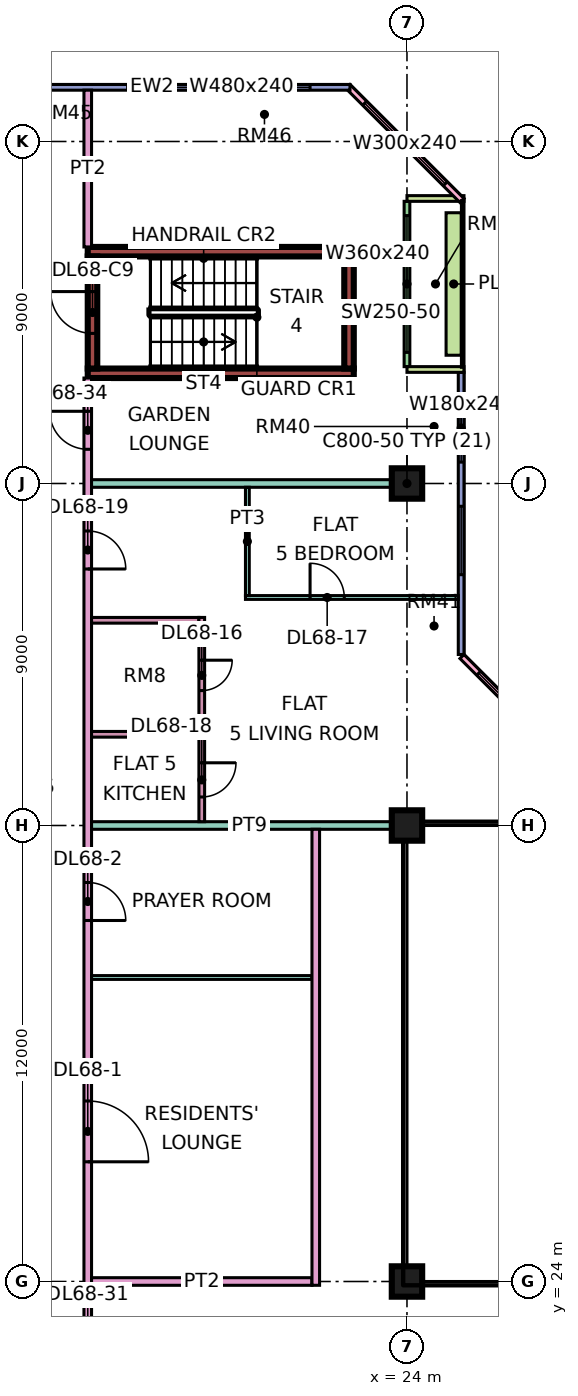
"""IFC4 building model, lengths in metres.
Left out: names, types, materials, properties, quantities, classifications, styles, units other than length and angle.
Written with IfcOpenShell. Run it as: python <this file> out.ifc"""

import sys

from ifc_helpers import new_model, si_unit, direction, frame, frame_2d, origin, origin_2d, place, context, subcontext, project, spatial, rectangle, extrude, element, fill, save


model = new_model("IFC4")
c1 = context("Model", 3, precision=1e-05, world=origin(), true_north=direction((0.0, 1.0)))
c2 = subcontext(c1, "Body", "Model", "MODEL_VIEW")
j1 = project(units=[si_unit("LENGTHUNIT", "METRE"), si_unit("PLANEANGLEUNIT", "RADIAN")], contexts=[c1])
p1 = place(None, origin())
s1 = spatial("IfcSite", under=j1, at=p1, CompositionType="ELEMENT")
p2 = place(p1, origin())
s2 = spatial("IfcBuilding", under=s1, at=p2, CompositionType="ELEMENT")
p3 = place(p2, frame((0.0, 0.0, 292.15)))
s3 = spatial("IfcBuildingStorey", under=s2, at=p3, CompositionType="ELEMENT", Elevation=292.15)
for number, where, z_axis, x_axis in (
    (1, (24.0, 24.0, 0.0), (0.0, 0.0, 1.0), (1.0, 0.0, 0.0)),
    (2, (24.0, 36.0, 0.0), (0.0, 0.0, 1.0), (1.0, 0.0, 0.0)),
    (3, (24.0, 45.0, 0.0), (0.0, 0.0, 1.0), (1.0, 0.0, 0.0)),
):
    element("IfcColumn", number, at=place(p3, frame(where, z_axis=z_axis, x_axis=x_axis)), inside=s3, PredefinedType="COLUMN", context=c2, shape_type="SweptSolid", body=[
        extrude(rectangle(XDim=0.8, YDim=0.8, at=origin_2d()), origin(), (0.0, 0.0, 1.0), 3.75),
    ])
for number, where, z_axis, x_axis in (
    (4, (15.6, 47.9, 0.0), (0.0, 0.0, 1.0), (1.0, 0.0, 0.0)),
    (5, (15.6, 51.1, 0.0), (0.0, 0.0, 1.0), (1.0, 0.0, 0.0)),
):
    element("IfcWall", number, at=place(p3, frame(where, z_axis=z_axis, x_axis=x_axis)), inside=s3, PredefinedType="SHEAR", context=c2, shape_type="SweptSolid", body=[
        extrude(rectangle(XDim=7.0, YDim=0.25, at=frame_2d((3.5, 0.0))), origin(), (0.0, 0.0, 1.0), 3.75),
    ])
p4 = place(p3, frame((15.725, 48.025, 0.0), z_axis=(0.0, 0.0, 1.0), x_axis=(0.0, 1.0, 0.0)))
e6 = element("IfcWall", 6, at=p4, inside=s3, PredefinedType="SHEAR", context=c2, shape_type="SweptSolid", body=[
    extrude(rectangle(XDim=2.95, YDim=0.25, at=frame_2d((1.475, 0.0))), origin(), (0.0, 0.0, 1.0), 3.75),
])
p5 = place(p4, frame((0.925, 0.0, 0.0)))
e7 = element("IfcOpeningElement", 7, at=p5, cuts=e6, PredefinedType="OPENING", context=c2, shape_type="SweptSolid", body=[
    extrude(rectangle(XDim=1.1, YDim=2.2, at=frame_2d((0.55, 1.1))), frame((0.0, 0.135, 0.0), z_axis=(0.0, -1.0, 0.0), x_axis=(1.0, 0.0, 0.0)), (0.0, 0.0, 1.0), 0.27),
])
p6 = place(p3, frame((22.475, 48.025, 0.0), z_axis=(0.0, 0.0, 1.0), x_axis=(0.0, 1.0, 0.0)))
e8 = element("IfcWall", 8, at=p6, inside=s3, PredefinedType="SHEAR", context=c2, shape_type="SweptSolid", body=[
    extrude(rectangle(XDim=2.95, YDim=0.25, at=frame_2d((1.475, 0.0))), origin(), (0.0, 0.0, 1.0), 3.75),
])
p7 = place(p3, frame((28.447, 37.447, 0.0), z_axis=(0.0, 0.0, 1.0), x_axis=(-0.707106781187, 0.707106781187, 0.0)))
e9 = element("IfcWall", 9, at=p7, inside=s3, PredefinedType="SOLIDWALL", context=c2, shape_type="SweptSolid", body=[
    extrude(rectangle(XDim=4.243, YDim=0.15, at=frame_2d((2.121, 0.0))), origin(), (0.0, 0.0, 1.0), 3.35),
])
p8 = place(p7, frame((0.621, 0.0, 0.45)))
e10 = element("IfcOpeningElement", 10, at=p8, cuts=e9, PredefinedType="OPENING", context=c2, shape_type="SweptSolid", body=[
    extrude(rectangle(XDim=3.0, YDim=2.4, at=frame_2d((1.5, 1.2))), frame((0.0, 0.085, 0.0), z_axis=(0.0, -1.0, 0.0), x_axis=(1.0, 0.0, 0.0)), (0.0, 0.0, 1.0), 0.17),
])
p9 = place(p3, frame((25.425, 40.5, 0.0), z_axis=(0.0, 0.0, 1.0), x_axis=(0.0, 1.0, 0.0)))
e11 = element("IfcWall", 11, at=p9, inside=s3, PredefinedType="SOLIDWALL", context=c2, shape_type="SweptSolid", body=[
    extrude(rectangle(XDim=7.425, YDim=0.15, at=frame_2d((3.712, 0.0))), origin(), (0.0, 0.0, 1.0), 3.35),
])
p10 = place(p9, frame((2.1, 0.0, 0.45)))
e12 = element("IfcOpeningElement", 12, at=p10, cuts=e11, PredefinedType="OPENING", context=c2, shape_type="SweptSolid", body=[
    extrude(rectangle(XDim=1.8, YDim=2.4, at=frame_2d((0.9, 1.2))), frame((0.0, 0.085, 0.0), z_axis=(0.0, -1.0, 0.0), x_axis=(1.0, 0.0, 0.0)), (0.0, 0.0, 1.0), 0.17),
])
p11 = place(p9, frame((5.062, 0.0, 0.45)))
e13 = element("IfcOpeningElement", 13, at=p11, cuts=e11, PredefinedType="OPENING", context=c2, shape_type="SweptSolid", body=[
    extrude(rectangle(XDim=1.8, YDim=2.4, at=frame_2d((0.9, 1.2))), frame((0.0, 0.085, 0.0), z_axis=(0.0, -1.0, 0.0), x_axis=(1.0, 0.0, 0.0)), (0.0, 0.0, 1.0), 0.17),
])
p12 = place(p3, frame((24.0, 48.075, 0.0), z_axis=(0.0, 0.0, 1.0), x_axis=(0.0, 1.0, 0.0)))
e14 = element("IfcWall", 14, at=p12, inside=s3, PredefinedType="SOLIDWALL", context=c2, shape_type="SweptSolid", body=[
    extrude(rectangle(XDim=4.35, YDim=0.15, at=frame_2d((2.175, 0.0))), origin(), (0.0, 0.0, 1.0), 3.35),
])
p13 = place(p12, frame((0.375, 0.0, 0.45)))
e15 = element("IfcOpeningElement", 15, at=p13, cuts=e14, PredefinedType="OPENING", context=c2, shape_type="SweptSolid", body=[
    extrude(rectangle(XDim=3.6, YDim=2.4, at=frame_2d((1.8, 1.2))), frame((0.0, 0.085, 0.0), z_axis=(0.0, -1.0, 0.0), x_axis=(1.0, 0.0, 0.0)), (0.0, 0.0, 1.0), 0.17),
])
for number, where, z_axis, x_axis in (
    (16, (25.5, 48.0, 0.0), (0.0, 0.0, 1.0), (-1.0, 0.0, 0.0)),
    (17, (25.5, 52.5, 0.0), (0.0, 0.0, 1.0), (-1.0, 0.0, 0.0)),
):
    element("IfcWall", number, at=place(p3, frame(where, z_axis=z_axis, x_axis=x_axis)), inside=s3, PredefinedType="SOLIDWALL", context=c2, shape_type="SweptSolid", body=[
        extrude(rectangle(XDim=1.5, YDim=0.15, at=frame_2d((0.75, 0.0))), origin(), (0.0, 0.0, 1.0), 3.35),
    ])
p14 = place(p3, frame((25.447, 52.447, 0.0), z_axis=(0.0, 0.0, 1.0), x_axis=(-0.707106781187, 0.707106781187, 0.0)))
e18 = element("IfcWall", 18, at=p14, inside=s3, PredefinedType="SOLIDWALL", context=c2, shape_type="SweptSolid", body=[
    extrude(rectangle(XDim=4.243, YDim=0.15, at=frame_2d((2.121, 0.0))), origin(), (0.0, 0.0, 1.0), 3.35),
])
p15 = place(p14, frame((0.621, 0.0, 0.45)))
e19 = element("IfcOpeningElement", 19, at=p15, cuts=e18, PredefinedType="OPENING", context=c2, shape_type="SweptSolid", body=[
    extrude(rectangle(XDim=3.0, YDim=2.4, at=frame_2d((1.5, 1.2))), frame((0.0, 0.085, 0.0), z_axis=(0.0, -1.0, 0.0), x_axis=(1.0, 0.0, 0.0)), (0.0, 0.0, 1.0), 0.17),
])
p16 = place(p3, frame((22.5, 55.425, 0.0), z_axis=(0.0, 0.0, 1.0), x_axis=(-1.0, 0.0, 0.0)))
e20 = element("IfcWall", 20, at=p16, inside=s3, PredefinedType="SOLIDWALL", context=c2, shape_type="SweptSolid", body=[
    extrude(rectangle(XDim=10.425, YDim=0.15, at=frame_2d((5.212, 0.0))), origin(), (0.0, 0.0, 1.0), 3.35),
])
p17 = place(p16, frame((1.05, 0.0, 0.45)))
e21 = element("IfcOpeningElement", 21, at=p17, cuts=e20, PredefinedType="OPENING", context=c2, shape_type="SweptSolid", body=[
    extrude(rectangle(XDim=4.8, YDim=2.4, at=frame_2d((2.4, 1.2))), frame((0.0, 0.085, 0.0), z_axis=(0.0, -1.0, 0.0), x_axis=(1.0, 0.0, 0.0)), (0.0, 0.0, 1.0), 0.17),
])
p18 = place(p3, frame((25.229, 48.375, 0.0), z_axis=(0.0, 0.0, 1.0), x_axis=(0.0, 1.0, 0.0)))
e22 = element("IfcWall", 22, at=p18, inside=s3, PredefinedType="SOLIDWALL", context=c2, shape_type="SweptSolid", body=[
    extrude(rectangle(XDim=3.75, YDim=0.4, at=frame_2d((1.875, 0.0))), origin(), (0.0, 0.0, 1.0), 0.7),
])
p19 = place(p3, frame((15.6, 20.0, 0.0), z_axis=(0.0, 0.0, 1.0), x_axis=(0.0, 1.0, 0.0)))
e23 = element("IfcWall", 23, at=p19, inside=s3, PredefinedType="PARTITIONING", context=c2, shape_type="SweptSolid", body=[
    extrude(rectangle(XDim=27.775, YDim=0.2, at=frame_2d((13.887, 0.0))), origin(), (0.0, 0.0, 1.0), 3.35),
])
p20 = place(p19, frame((7.15, 0.0, 0.0)))
e24 = element("IfcOpeningElement", 24, at=p20, cuts=e23, PredefinedType="OPENING", context=c2, shape_type="SweptSolid", body=[
    extrude(rectangle(XDim=1.6, YDim=2.1, at=frame_2d((0.8, 1.05))), frame((0.0, 0.11, 0.0), z_axis=(0.0, -1.0, 0.0), x_axis=(1.0, 0.0, 0.0)), (0.0, 0.0, 1.0), 0.22),
])
p21 = place(p19, frame((13.5, 0.0, 0.0)))
e25 = element("IfcOpeningElement", 25, at=p21, cuts=e23, PredefinedType="OPENING", context=c2, shape_type="SweptSolid", body=[
    extrude(rectangle(XDim=1.0, YDim=2.1, at=frame_2d((0.5, 1.05))), frame((0.0, 0.11, 0.0), z_axis=(0.0, -1.0, 0.0), x_axis=(1.0, 0.0, 0.0)), (0.0, 0.0, 1.0), 0.22),
])
p22 = place(p19, frame((22.75, 0.0, 0.0)))
e26 = element("IfcOpeningElement", 26, at=p22, cuts=e23, PredefinedType="OPENING", context=c2, shape_type="SweptSolid", body=[
    extrude(rectangle(XDim=1.0, YDim=2.1, at=frame_2d((0.5, 1.05))), frame((0.0, 0.11, 0.0), z_axis=(0.0, -1.0, 0.0), x_axis=(1.0, 0.0, 0.0)), (0.0, 0.0, 1.0), 0.22),
])
p23 = place(p19, frame((1.15, 0.0, 0.0)))
e27 = element("IfcOpeningElement", 27, at=p23, cuts=e23, PredefinedType="OPENING", context=c2, shape_type="SweptSolid", body=[
    extrude(rectangle(XDim=1.8, YDim=2.1, at=frame_2d((0.9, 1.05))), frame((0.0, 0.11, 0.0), z_axis=(0.0, -1.0, 0.0), x_axis=(1.0, 0.0, 0.0)), (0.0, 0.0, 1.0), 0.22),
])
p24 = place(p19, frame((25.9, 0.0, 0.0)))
e28 = element("IfcOpeningElement", 28, at=p24, cuts=e23, PredefinedType="OPENING", context=c2, shape_type="SweptSolid", body=[
    extrude(rectangle(XDim=1.0, YDim=2.1, at=frame_2d((0.5, 1.05))), frame((0.0, 0.11, 0.0), z_axis=(0.0, -1.0, 0.0), x_axis=(1.0, 0.0, 0.0)), (0.0, 0.0, 1.0), 0.22),
])
p25 = place(p3, frame((15.6, 51.225, 0.0), z_axis=(0.0, 0.0, 1.0), x_axis=(0.0, 1.0, 0.0)))
e29 = element("IfcWall", 29, at=p25, inside=s3, PredefinedType="PARTITIONING", context=c2, shape_type="SweptSolid", body=[
    extrude(rectangle(XDim=4.125, YDim=0.2, at=frame_2d((2.062, 0.0))), origin(), (0.0, 0.0, 1.0), 3.35),
])
p26 = place(p3, frame((15.7, 24.0, 0.0), z_axis=(0.0, 0.0, 1.0), x_axis=(1.0, 0.0, 0.0)))
e30 = element("IfcWall", 30, at=p26, inside=s3, PredefinedType="PARTITIONING", context=c2, shape_type="SweptSolid", body=[
    extrude(rectangle(XDim=5.8, YDim=0.2, at=frame_2d((2.9, 0.0))), origin(), (0.0, 0.0, 1.0), 3.35),
])
p27 = place(p3, frame((15.7, 32.0, 0.0), z_axis=(0.0, 0.0, 1.0), x_axis=(1.0, 0.0, 0.0)))
e31 = element("IfcWall", 31, at=p27, inside=s3, PredefinedType="PARTITIONING", context=c2, shape_type="SweptSolid", body=[
    extrude(rectangle(XDim=5.8, YDim=0.1, at=frame_2d((2.9, 0.0))), origin(), (0.0, 0.0, 1.0), 3.35),
])
p28 = place(p3, frame((15.7, 36.0, 0.0), z_axis=(0.0, 0.0, 1.0), x_axis=(1.0, 0.0, 0.0)))
e32 = element("IfcWall", 32, at=p28, inside=s3, PredefinedType="PARTITIONING", context=c2, shape_type="SweptSolid", body=[
    extrude(rectangle(XDim=8.3, YDim=0.2, at=frame_2d((4.15, 0.0))), origin(), (0.0, 0.0, 1.0), 3.35),
])
for number, where, z_axis, x_axis in (
    (33, (15.7, 38.4, 0.0), (0.0, 0.0, 1.0), (1.0, 0.0, 0.0)),
    (34, (15.7, 41.4, 0.0), (0.0, 0.0, 1.0), (1.0, 0.0, 0.0)),
):
    element("IfcWall", number, at=place(p3, frame(where, z_axis=z_axis, x_axis=x_axis)), inside=s3, PredefinedType="PARTITIONING", context=c2, shape_type="SweptSolid", body=[
        extrude(rectangle(XDim=2.825, YDim=0.15, at=frame_2d((1.413, 0.0))), origin(), (0.0, 0.0, 1.0), 3.35),
    ])
p29 = place(p3, frame((15.7, 45.0, 0.0), z_axis=(0.0, 0.0, 1.0), x_axis=(1.0, 0.0, 0.0)))
e35 = element("IfcWall", 35, at=p29, inside=s3, PredefinedType="PARTITIONING", context=c2, shape_type="SweptSolid", body=[
    extrude(rectangle(XDim=8.3, YDim=0.2, at=frame_2d((4.15, 0.0))), origin(), (0.0, 0.0, 1.0), 3.35),
])
p30 = place(p3, frame((18.6, 36.1, 0.0), z_axis=(0.0, 0.0, 1.0), x_axis=(0.0, 1.0, 0.0)))
e36 = element("IfcWall", 36, at=p30, inside=s3, PredefinedType="PARTITIONING", context=c2, shape_type="SweptSolid", body=[
    extrude(rectangle(XDim=5.375, YDim=0.15, at=frame_2d((2.688, 0.0))), origin(), (0.0, 0.0, 1.0), 3.35),
])
p31 = place(p30, frame((3.45, 0.0, 0.0)))
e37 = element("IfcOpeningElement", 37, at=p31, cuts=e36, PredefinedType="OPENING", context=c2, shape_type="SweptSolid", body=[
    extrude(rectangle(XDim=0.8, YDim=2.1, at=frame_2d((0.4, 1.05))), frame((0.0, 0.085, 0.0), z_axis=(0.0, -1.0, 0.0), x_axis=(1.0, 0.0, 0.0)), (0.0, 0.0, 1.0), 0.17),
])
p32 = place(p30, frame((0.65, 0.0, 0.0)))
e38 = element("IfcOpeningElement", 38, at=p32, cuts=e36, PredefinedType="OPENING", context=c2, shape_type="SweptSolid", body=[
    extrude(rectangle(XDim=0.9, YDim=2.1, at=frame_2d((0.45, 1.05))), frame((0.0, 0.085, 0.0), z_axis=(0.0, -1.0, 0.0), x_axis=(1.0, 0.0, 0.0)), (0.0, 0.0, 1.0), 0.17),
])
p33 = place(p3, frame((19.75, 42.0, 0.0), z_axis=(0.0, 0.0, 1.0), x_axis=(1.0, 0.0, 0.0)))
e39 = element("IfcWall", 39, at=p33, inside=s3, PredefinedType="PARTITIONING", context=c2, shape_type="SweptSolid", body=[
    extrude(rectangle(XDim=5.6, YDim=0.1, at=frame_2d((2.8, 0.0))), origin(), (0.0, 0.0, 1.0), 3.35),
])
p34 = place(p33, frame((1.7, 0.0, 0.0)))
e40 = element("IfcOpeningElement", 40, at=p34, cuts=e39, PredefinedType="OPENING", context=c2, shape_type="SweptSolid", body=[
    extrude(rectangle(XDim=0.9, YDim=2.1, at=frame_2d((0.45, 1.05))), frame((0.0, 0.06, 0.0), z_axis=(0.0, -1.0, 0.0), x_axis=(1.0, 0.0, 0.0)), (0.0, 0.0, 1.0), 0.12),
])
p35 = place(p3, frame((19.8, 42.05, 0.0), z_axis=(0.0, 0.0, 1.0), x_axis=(0.0, 1.0, 0.0)))
e41 = element("IfcWall", 41, at=p35, inside=s3, PredefinedType="PARTITIONING", context=c2, shape_type="SweptSolid", body=[
    extrude(rectangle(XDim=2.85, YDim=0.1, at=frame_2d((1.425, 0.0))), origin(), (0.0, 0.0, 1.0), 3.35),
])
p36 = place(p3, frame((21.6, 23.9, 0.0), z_axis=(0.0, 0.0, 1.0), x_axis=(0.0, 1.0, 0.0)))
e42 = element("IfcWall", 42, at=p36, inside=s3, PredefinedType="PARTITIONING", context=c2, shape_type="SweptSolid", body=[
    extrude(rectangle(XDim=12.0, YDim=0.2, at=frame_2d((6.0, 0.0))), origin(), (0.0, 0.0, 1.0), 3.35),
])
p37 = place(p8, origin())
e43 = element("IfcWindow", 43, at=p37, inside=s3, PartitioningType="SINGLE_PANEL", PredefinedType="WINDOW", context=c2, shape_type="SweptSolid", body=[
    extrude(rectangle(XDim=3.0, YDim=2.4, at=frame_2d((1.5, 1.2))), frame((0.0, 0.03, 0.0), z_axis=(0.0, -1.0, 0.0), x_axis=(1.0, 0.0, 0.0)), (0.0, 0.0, 1.0), 0.06),
])
fill(e10, e43)
p38 = place(p10, origin())
e44 = element("IfcWindow", 44, at=p38, inside=s3, PartitioningType="SINGLE_PANEL", PredefinedType="WINDOW", context=c2, shape_type="SweptSolid", body=[
    extrude(rectangle(XDim=1.8, YDim=2.4, at=frame_2d((0.9, 1.2))), frame((0.0, 0.03, 0.0), z_axis=(0.0, -1.0, 0.0), x_axis=(1.0, 0.0, 0.0)), (0.0, 0.0, 1.0), 0.06),
])
fill(e12, e44)
p39 = place(p11, origin())
e45 = element("IfcWindow", 45, at=p39, inside=s3, PartitioningType="SINGLE_PANEL", PredefinedType="WINDOW", context=c2, shape_type="SweptSolid", body=[
    extrude(rectangle(XDim=1.8, YDim=2.4, at=frame_2d((0.9, 1.2))), frame((0.0, 0.03, 0.0), z_axis=(0.0, -1.0, 0.0), x_axis=(1.0, 0.0, 0.0)), (0.0, 0.0, 1.0), 0.06),
])
fill(e13, e45)
p40 = place(p13, origin())
e46 = element("IfcWindow", 46, at=p40, inside=s3, PartitioningType="SINGLE_PANEL", PredefinedType="WINDOW", context=c2, shape_type="SweptSolid", body=[
    extrude(rectangle(XDim=3.6, YDim=2.4, at=frame_2d((1.8, 1.2))), frame((0.0, 0.03, 0.0), z_axis=(0.0, -1.0, 0.0), x_axis=(1.0, 0.0, 0.0)), (0.0, 0.0, 1.0), 0.06),
])
fill(e15, e46)
p41 = place(p15, origin())
e47 = element("IfcWindow", 47, at=p41, inside=s3, PartitioningType="SINGLE_PANEL", PredefinedType="WINDOW", context=c2, shape_type="SweptSolid", body=[
    extrude(rectangle(XDim=3.0, YDim=2.4, at=frame_2d((1.5, 1.2))), frame((0.0, 0.03, 0.0), z_axis=(0.0, -1.0, 0.0), x_axis=(1.0, 0.0, 0.0)), (0.0, 0.0, 1.0), 0.06),
])
fill(e19, e47)
p42 = place(p17, origin())
e48 = element("IfcWindow", 48, at=p42, inside=s3, PartitioningType="SINGLE_PANEL", PredefinedType="WINDOW", context=c2, shape_type="SweptSolid", body=[
    extrude(rectangle(XDim=4.8, YDim=2.4, at=frame_2d((2.4, 1.2))), frame((0.0, 0.03, 0.0), z_axis=(0.0, -1.0, 0.0), x_axis=(1.0, 0.0, 0.0)), (0.0, 0.0, 1.0), 0.06),
])
fill(e21, e48)
p43 = place(p5, frame((1.1, 0.0, 0.0), z_axis=(0.0, 0.0, 1.0), x_axis=(-1.0, 0.0, 0.0)))
e49 = element("IfcDoor", 49, at=p43, inside=s3, OperationType="SINGLE_SWING_RIGHT", PredefinedType="DOOR", context=c2, shape_type="SweptSolid", body=[
    extrude(rectangle(XDim=1.1, YDim=2.2, at=frame_2d((0.55, 1.1))), frame((0.0, 0.025, 0.0), z_axis=(0.0, -1.0, 0.0), x_axis=(1.0, 0.0, 0.0)), (0.0, 0.0, 1.0), 0.05),
])
fill(e7, e49)
p44 = place(p20, frame((1.6, 0.0, 0.0), z_axis=(0.0, 0.0, 1.0), x_axis=(-1.0, 0.0, 0.0)))
e50 = element("IfcDoor", 50, at=p44, inside=s3, OperationType="DOUBLE_DOOR_SINGLE_SWING", PredefinedType="DOOR", context=c2, shape_type="SweptSolid", body=[
    extrude(rectangle(XDim=1.6, YDim=2.1, at=frame_2d((0.8, 1.05))), frame((0.0, 0.025, 0.0), z_axis=(0.0, -1.0, 0.0), x_axis=(1.0, 0.0, 0.0)), (0.0, 0.0, 1.0), 0.05),
])
fill(e24, e50)
p45 = place(p21, frame((1.0, 0.0, 0.0), z_axis=(0.0, 0.0, 1.0), x_axis=(-1.0, 0.0, 0.0)))
e51 = element("IfcDoor", 51, at=p45, inside=s3, OperationType="SINGLE_SWING_LEFT", PredefinedType="DOOR", context=c2, shape_type="SweptSolid", body=[
    extrude(rectangle(XDim=1.0, YDim=2.1, at=frame_2d((0.5, 1.05))), frame((0.0, 0.025, 0.0), z_axis=(0.0, -1.0, 0.0), x_axis=(1.0, 0.0, 0.0)), (0.0, 0.0, 1.0), 0.05),
])
fill(e25, e51)
p46 = place(p31, origin())
e52 = element("IfcDoor", 52, at=p46, inside=s3, OperationType="SINGLE_SWING_RIGHT", PredefinedType="DOOR", context=c2, shape_type="SweptSolid", body=[
    extrude(rectangle(XDim=0.8, YDim=2.1, at=frame_2d((0.4, 1.05))), frame((0.0, 0.025, 0.0), z_axis=(0.0, -1.0, 0.0), x_axis=(1.0, 0.0, 0.0)), (0.0, 0.0, 1.0), 0.05),
])
fill(e37, e52)
p47 = place(p34, origin())
e53 = element("IfcDoor", 53, at=p47, inside=s3, OperationType="SINGLE_SWING_LEFT", PredefinedType="DOOR", context=c2, shape_type="SweptSolid", body=[
    extrude(rectangle(XDim=0.9, YDim=2.1, at=frame_2d((0.45, 1.05))), frame((0.0, 0.025, 0.0), z_axis=(0.0, -1.0, 0.0), x_axis=(1.0, 0.0, 0.0)), (0.0, 0.0, 1.0), 0.05),
])
fill(e40, e53)
p48 = place(p32, origin())
e54 = element("IfcDoor", 54, at=p48, inside=s3, OperationType="SINGLE_SWING_RIGHT", PredefinedType="DOOR", context=c2, shape_type="SweptSolid", body=[
    extrude(rectangle(XDim=0.9, YDim=2.1, at=frame_2d((0.45, 1.05))), frame((0.0, 0.025, 0.0), z_axis=(0.0, -1.0, 0.0), x_axis=(1.0, 0.0, 0.0)), (0.0, 0.0, 1.0), 0.05),
])
fill(e38, e54)
p49 = place(p22, frame((1.0, 0.0, 0.0), z_axis=(0.0, 0.0, 1.0), x_axis=(-1.0, 0.0, 0.0)))
e55 = element("IfcDoor", 55, at=p49, inside=s3, OperationType="SINGLE_SWING_LEFT", PredefinedType="DOOR", context=c2, shape_type="SweptSolid", body=[
    extrude(rectangle(XDim=1.0, YDim=2.1, at=frame_2d((0.5, 1.05))), frame((0.0, 0.025, 0.0), z_axis=(0.0, -1.0, 0.0), x_axis=(1.0, 0.0, 0.0)), (0.0, 0.0, 1.0), 0.05),
])
fill(e26, e55)
p50 = place(p24, frame((1.0, 0.0, 0.0), z_axis=(0.0, 0.0, 1.0), x_axis=(-1.0, 0.0, 0.0)))
e56 = element("IfcDoor", 56, at=p50, inside=s3, OperationType="SINGLE_SWING_RIGHT", PredefinedType="DOOR", context=c2, shape_type="SweptSolid", body=[
    extrude(rectangle(XDim=1.0, YDim=2.1, at=frame_2d((0.5, 1.05))), frame((0.0, 0.025, 0.0), z_axis=(0.0, -1.0, 0.0), x_axis=(1.0, 0.0, 0.0)), (0.0, 0.0, 1.0), 0.05),
])
fill(e28, e56)
save(model, sys.argv[1])
